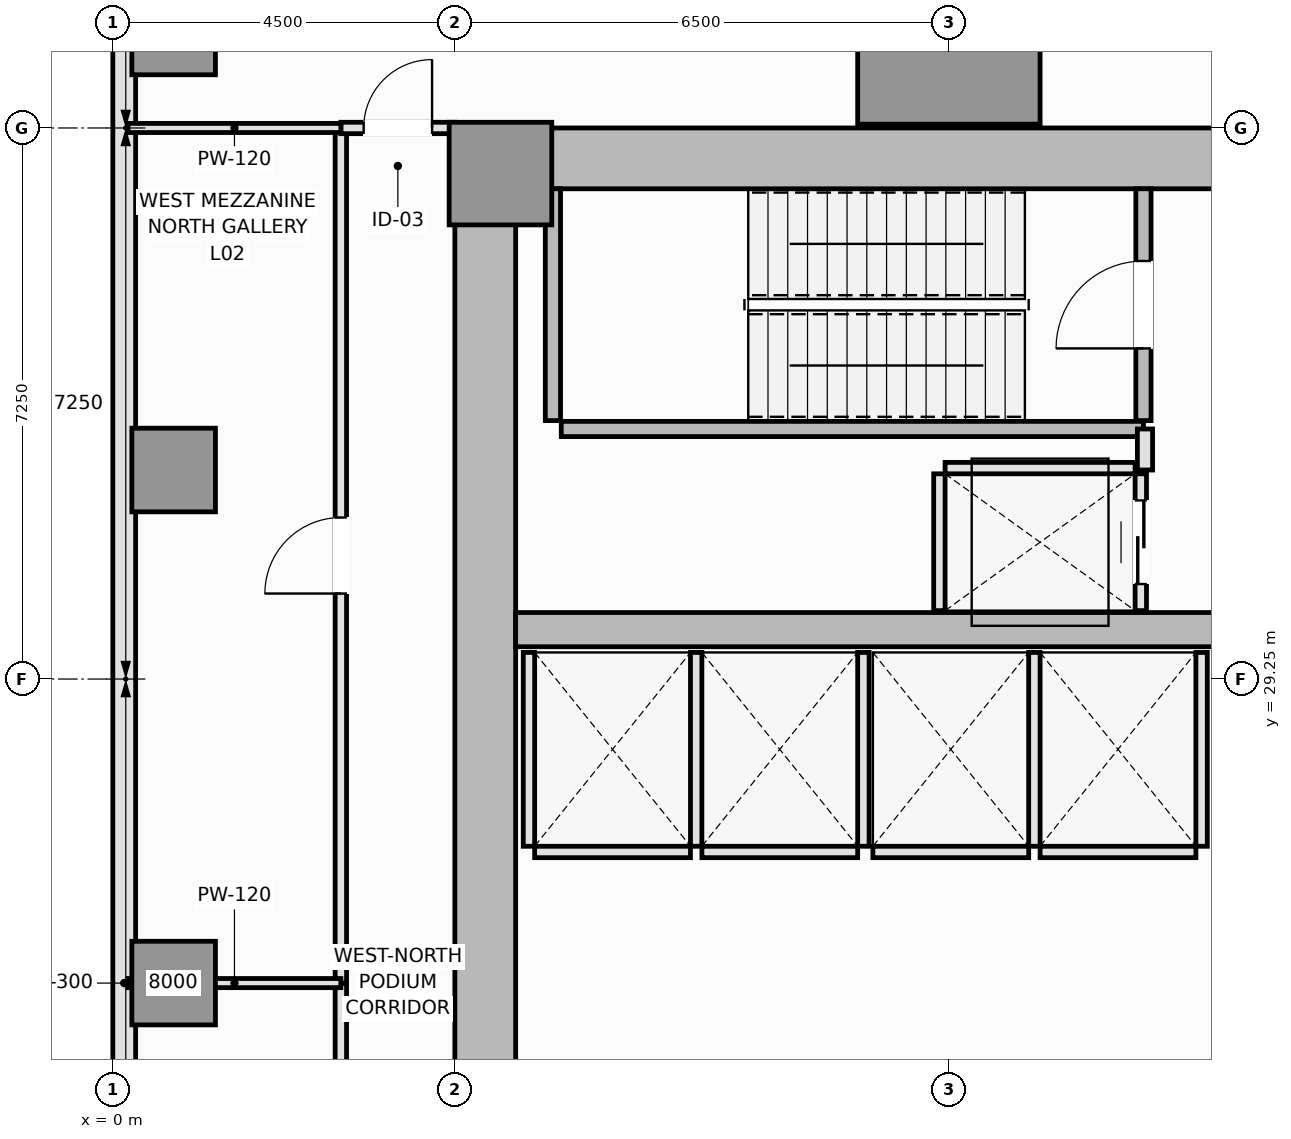
"""IFC4 building model, lengths in metres.
Left out: names, types, materials, properties, quantities, classifications, styles, units other than length and angle.
Written with IfcOpenShell. Run it as: python <this file> out.ifc"""

import sys

from ifc_helpers import new_model, si_unit, direction, frame, frame_2d, origin, origin_2d, place, context, subcontext, project, spatial, rectangle, extrude, element, fill, save


model = new_model("IFC4")
c1 = context("Model", 3, precision=1e-05, world=origin(), true_north=direction((0.0, 1.0)))
c2 = subcontext(c1, "Body", "Model", "MODEL_VIEW")
j1 = project(units=[si_unit("LENGTHUNIT", "METRE"), si_unit("PLANEANGLEUNIT", "RADIAN")], contexts=[c1])
p1 = place(None, origin())
s1 = spatial("IfcSite", under=j1, at=p1, CompositionType="ELEMENT")
p2 = place(p1, origin())
s2 = spatial("IfcBuilding", under=s1, at=p2, CompositionType="ELEMENT")
p3 = place(p2, frame((0.0, 0.0, 10.8)))
s3 = spatial("IfcBuildingStorey", under=s2, at=p3, CompositionType="ELEMENT", Elevation=10.8)
p4 = place(p3, frame((4.5, 36.1, 0.0), z_axis=(0.0, 0.0, 1.0), x_axis=(1.0, 0.0, 0.0)))
e1 = element("IfcWall", 1, at=p4, inside=s3, PredefinedType="SHEAR", context=c2, shape_type="SweptSolid", body=[
    extrude(rectangle(XDim=13.5, YDim=0.8, at=frame_2d((6.75, 0.0))), origin(), (0.0, 0.0, 1.0), 4.8),
])
p5 = place(p3, frame((4.9, 14.8, 0.0), z_axis=(0.0, 0.0, 1.0), x_axis=(0.0, 1.0, 0.0)))
e2 = element("IfcWall", 2, at=p5, inside=s3, PredefinedType="SHEAR", context=c2, shape_type="SweptSolid", body=[
    extrude(rectangle(XDim=20.9, YDim=0.8, at=frame_2d((10.45, 0.0))), origin(), (0.0, 0.0, 1.0), 4.8),
])
p6 = place(p3, frame((5.3, 29.9, 0.0), z_axis=(0.0, 0.0, 1.0), x_axis=(1.0, 0.0, 0.0)))
e3 = element("IfcWall", 3, at=p6, inside=s3, PredefinedType="SHEAR", context=c2, shape_type="SweptSolid", body=[
    extrude(rectangle(XDim=11.9, YDim=0.45, at=frame_2d((5.95, 0.0))), origin(), (0.0, 0.0, 1.0), 4.8),
])
p7 = place(p3, frame((5.1, 35.9, 0.0), z_axis=(0.0, 0.0, 1.0), x_axis=(1.0, 0.0, 0.0)))
e4 = element("IfcColumn", 4, at=p7, inside=s3, PredefinedType="PILASTER", context=c2, shape_type="SweptSolid", body=[
    extrude(rectangle(XDim=1.35, YDim=1.35, at=origin_2d()), origin(), (0.0, 0.0, 1.0), 4.8),
])
p8 = place(p3, frame((11.0, 37.75, 0.0), z_axis=(0.0, 0.0, 1.0), x_axis=(1.0, 0.0, 0.0)))
e5 = element("IfcColumn", 5, at=p8, inside=s3, PredefinedType="COLUMN", context=c2, shape_type="SweptSolid", body=[
    extrude(rectangle(XDim=2.4, YDim=2.4, at=origin_2d()), origin(), (0.0, 0.0, 1.0), 4.8),
])
for number, where, z_axis, x_axis in (
    (6, (0.8, 25.25, 0.0), (0.0, 0.0, 1.0), (1.0, 0.0, 0.0)),
    (7, (0.8, 32.0, 0.0), (0.0, 0.0, 1.0), (1.0, 0.0, 0.0)),
    (8, (0.8, 37.75, 0.0), (0.0, 0.0, 1.0), (1.0, 0.0, 0.0)),
):
    element("IfcColumn", number, at=place(p3, frame(where, z_axis=z_axis, x_axis=x_axis)), inside=s3, PredefinedType="COLUMN", context=c2, shape_type="SweptSolid", body=[
        extrude(rectangle(XDim=1.1, YDim=1.1, at=origin_2d()), origin(), (0.0, 0.0, 1.0), 4.8),
    ])
p9 = place(p3, frame((0.15, 50.35, 0.0), z_axis=(0.0, 0.0, 1.0), x_axis=(0.0, -1.0, 0.0)))
e9 = element("IfcWall", 9, at=p9, inside=s3, PredefinedType="SOLIDWALL", context=c2, shape_type="SweptSolid", body=[
    extrude(rectangle(XDim=50.2, YDim=0.3, at=frame_2d((25.1, 0.0))), origin(), (0.0, 0.0, 1.0), 4.6),
])
p10 = place(p9, frame((6.5, 0.0, 0.9)))
e10 = element("IfcOpeningElement", 10, at=p10, cuts=e9, PredefinedType="OPENING", context=c2, shape_type="SweptSolid", body=[
    extrude(rectangle(XDim=2.6, YDim=2.2, at=frame_2d((1.3, 1.1))), frame((0.0, 0.16, 0.0), z_axis=(0.0, -1.0, 0.0), x_axis=(1.0, 0.0, 0.0)), (0.0, 0.0, 1.0), 0.32),
])
p11 = place(p9, frame((42.0, 0.0, 0.9)))
e11 = element("IfcOpeningElement", 11, at=p11, cuts=e9, PredefinedType="OPENING", context=c2, shape_type="SweptSolid", body=[
    extrude(rectangle(XDim=2.6, YDim=2.2, at=frame_2d((1.3, 1.1))), frame((0.0, 0.16, 0.0), z_axis=(0.0, -1.0, 0.0), x_axis=(1.0, 0.0, 0.0)), (0.0, 0.0, 1.0), 0.32),
])
p12 = place(p3, frame((5.79, 32.65, 0.0), z_axis=(0.0, 0.0, 1.0), x_axis=(0.0, 1.0, 0.0)))
e12 = element("IfcWall", 12, at=p12, inside=s3, PredefinedType="SOLIDWALL", context=c2, shape_type="SweptSolid", body=[
    extrude(rectangle(XDim=3.05, YDim=0.2, at=frame_2d((1.525, 0.0))), origin(), (0.0, 0.0, 1.0), 4.8),
])
p13 = place(p3, frame((5.9, 32.54, 0.0), z_axis=(0.0, 0.0, 1.0), x_axis=(1.0, 0.0, 0.0)))
e13 = element("IfcWall", 13, at=p13, inside=s3, PredefinedType="SOLIDWALL", context=c2, shape_type="SweptSolid", body=[
    extrude(rectangle(XDim=7.66, YDim=0.2, at=frame_2d((3.83, 0.0))), origin(), (0.0, 0.0, 1.0), 4.8),
])
p14 = place(p3, frame((13.56, 32.65, 0.0), z_axis=(0.0, 0.0, 1.0), x_axis=(0.0, 1.0, 0.0)))
e14 = element("IfcWall", 14, at=p14, inside=s3, PredefinedType="SOLIDWALL", context=c2, shape_type="SweptSolid", body=[
    extrude(rectangle(XDim=3.05, YDim=0.2, at=frame_2d((1.525, 0.0))), origin(), (0.0, 0.0, 1.0), 4.8),
])
p15 = place(p14, frame((0.95, 0.0, 0.0)))
e15 = element("IfcOpeningElement", 15, at=p15, cuts=e14, PredefinedType="OPENING", context=c2, shape_type="SweptSolid", body=[
    extrude(rectangle(XDim=1.15, YDim=2.15, at=frame_2d((0.575, 1.075))), frame((0.0, 0.11, 0.0), z_axis=(0.0, -1.0, 0.0), x_axis=(1.0, 0.0, 0.0)), (0.0, 0.0, 1.0), 0.22),
])
p16 = place(p3, frame((5.55, 26.975, 0.0), z_axis=(0.0, 0.0, 1.0), x_axis=(1.0, 0.0, 0.0)))
e16 = element("IfcWall", 16, at=p16, inside=s3, PredefinedType="PARTITIONING", context=c2, shape_type="SweptSolid", body=[
    extrude(rectangle(XDim=2.05, YDim=0.15, at=frame_2d((1.025, 0.0))), origin(), (0.0, 0.0, 1.0), 4.6),
])
for number, where, z_axis, x_axis in (
    (17, (5.475, 27.05, 0.0), (0.0, 0.0, 1.0), (0.0, 1.0, 0.0)),
    (18, (7.675, 27.05, 0.0), (0.0, 0.0, 1.0), (0.0, 1.0, 0.0)),
):
    element("IfcWall", number, at=place(p3, frame(where, z_axis=z_axis, x_axis=x_axis)), inside=s3, PredefinedType="PARTITIONING", context=c2, shape_type="SweptSolid", body=[
        extrude(rectangle(XDim=2.55, YDim=0.15, at=frame_2d((1.275, 0.0))), origin(), (0.0, 0.0, 1.0), 4.6),
    ])
p17 = place(p3, frame((7.75, 26.975, 0.0), z_axis=(0.0, 0.0, 1.0), x_axis=(1.0, 0.0, 0.0)))
e19 = element("IfcWall", 19, at=p17, inside=s3, PredefinedType="PARTITIONING", context=c2, shape_type="SweptSolid", body=[
    extrude(rectangle(XDim=2.05, YDim=0.15, at=frame_2d((1.025, 0.0))), origin(), (0.0, 0.0, 1.0), 4.6),
])
p18 = place(p3, frame((9.875, 27.05, 0.0), z_axis=(0.0, 0.0, 1.0), x_axis=(0.0, 1.0, 0.0)))
e20 = element("IfcWall", 20, at=p18, inside=s3, PredefinedType="PARTITIONING", context=c2, shape_type="SweptSolid", body=[
    extrude(rectangle(XDim=2.55, YDim=0.15, at=frame_2d((1.275, 0.0))), origin(), (0.0, 0.0, 1.0), 4.6),
])
p19 = place(p3, frame((10.0, 26.975, 0.0), z_axis=(0.0, 0.0, 1.0), x_axis=(1.0, 0.0, 0.0)))
e21 = element("IfcWall", 21, at=p19, inside=s3, PredefinedType="PARTITIONING", context=c2, shape_type="SweptSolid", body=[
    extrude(rectangle(XDim=2.05, YDim=0.15, at=frame_2d((1.025, 0.0))), origin(), (0.0, 0.0, 1.0), 4.6),
])
p20 = place(p3, frame((12.125, 27.05, 0.0), z_axis=(0.0, 0.0, 1.0), x_axis=(0.0, 1.0, 0.0)))
e22 = element("IfcWall", 22, at=p20, inside=s3, PredefinedType="PARTITIONING", context=c2, shape_type="SweptSolid", body=[
    extrude(rectangle(XDim=2.55, YDim=0.15, at=frame_2d((1.275, 0.0))), origin(), (0.0, 0.0, 1.0), 4.6),
])
p21 = place(p3, frame((12.2, 26.975, 0.0), z_axis=(0.0, 0.0, 1.0), x_axis=(1.0, 0.0, 0.0)))
e23 = element("IfcWall", 23, at=p21, inside=s3, PredefinedType="PARTITIONING", context=c2, shape_type="SweptSolid", body=[
    extrude(rectangle(XDim=2.05, YDim=0.15, at=frame_2d((1.025, 0.0))), origin(), (0.0, 0.0, 1.0), 4.6),
])
p22 = place(p3, frame((14.325, 27.05, 0.0), z_axis=(0.0, 0.0, 1.0), x_axis=(0.0, 1.0, 0.0)))
e24 = element("IfcWall", 24, at=p22, inside=s3, PredefinedType="PARTITIONING", context=c2, shape_type="SweptSolid", body=[
    extrude(rectangle(XDim=2.55, YDim=0.15, at=frame_2d((1.275, 0.0))), origin(), (0.0, 0.0, 1.0), 4.6),
])
p23 = place(p3, frame((10.95, 32.025, 0.0), z_axis=(0.0, 0.0, 1.0), x_axis=(1.0, 0.0, 0.0)))
e25 = element("IfcWall", 25, at=p23, inside=s3, PredefinedType="PARTITIONING", context=c2, shape_type="SweptSolid", body=[
    extrude(rectangle(XDim=2.5, YDim=0.15, at=frame_2d((1.25, 0.0))), origin(), (0.0, 0.0, 1.0), 4.6),
])
p24 = place(p3, frame((10.875, 30.15, 0.0), z_axis=(0.0, 0.0, 1.0), x_axis=(0.0, 1.0, 0.0)))
e26 = element("IfcWall", 26, at=p24, inside=s3, PredefinedType="PARTITIONING", context=c2, shape_type="SweptSolid", body=[
    extrude(rectangle(XDim=1.8, YDim=0.15, at=frame_2d((0.9, 0.0))), origin(), (0.0, 0.0, 1.0), 4.6),
])
p25 = place(p3, frame((13.525, 30.15, 0.0), z_axis=(0.0, 0.0, 1.0), x_axis=(0.0, 1.0, 0.0)))
e27 = element("IfcWall", 27, at=p25, inside=s3, PredefinedType="PARTITIONING", context=c2, shape_type="SweptSolid", body=[
    extrude(rectangle(XDim=1.8, YDim=0.15, at=frame_2d((0.9, 0.0))), origin(), (0.0, 0.0, 1.0), 4.6),
])
p26 = place(p25, frame((0.35, 0.0, 0.0)))
e28 = element("IfcOpeningElement", 28, at=p26, cuts=e27, PredefinedType="OPENING", context=c2, shape_type="SweptSolid", body=[
    extrude(rectangle(XDim=1.1, YDim=2.2, at=frame_2d((0.55, 1.1))), frame((0.0, 0.085, 0.0), z_axis=(0.0, -1.0, 0.0), x_axis=(1.0, 0.0, 0.0)), (0.0, 0.0, 1.0), 0.17),
])
p27 = place(p3, frame((13.58, 32.0, 0.0), z_axis=(0.0, 0.0, 1.0), x_axis=(0.0, 1.0, 0.0)))
e29 = element("IfcWall", 29, at=p27, inside=s3, PredefinedType="PARTITIONING", context=c2, shape_type="SweptSolid", body=[
    extrude(rectangle(XDim=0.54, YDim=0.2, at=frame_2d((0.27, 0.0))), origin(), (0.0, 0.0, 1.0), 4.6),
])
p28 = place(p3, frame((3.0, 14.0, 0.0), z_axis=(0.0, 0.0, 1.0), x_axis=(0.0, 1.0, 0.0)))
e30 = element("IfcWall", 30, at=p28, inside=s3, PredefinedType="PARTITIONING", context=c2, shape_type="SweptSolid", body=[
    extrude(rectangle(XDim=11.25, YDim=0.15, at=frame_2d((5.625, 0.0))), origin(), (0.0, 0.0, 1.0), 4.6),
])
p29 = place(p28, frame((5.125, 0.0, 0.0)))
e31 = element("IfcOpeningElement", 31, at=p29, cuts=e30, PredefinedType="OPENING", context=c2, shape_type="SweptSolid", body=[
    extrude(rectangle(XDim=1.0, YDim=2.15, at=frame_2d((0.5, 1.075))), frame((0.0, 0.085, 0.0), z_axis=(0.0, -1.0, 0.0), x_axis=(1.0, 0.0, 0.0)), (0.0, 0.0, 1.0), 0.17),
])
p30 = place(p3, frame((3.0, 25.25, 0.0), z_axis=(0.0, 0.0, 1.0), x_axis=(0.0, 1.0, 0.0)))
e32 = element("IfcWall", 32, at=p30, inside=s3, PredefinedType="PARTITIONING", context=c2, shape_type="SweptSolid", body=[
    extrude(rectangle(XDim=11.25, YDim=0.15, at=frame_2d((5.625, 0.0))), origin(), (0.0, 0.0, 1.0), 4.6),
])
p31 = place(p30, frame((5.125, 0.0, 0.0)))
e33 = element("IfcOpeningElement", 33, at=p31, cuts=e32, PredefinedType="OPENING", context=c2, shape_type="SweptSolid", body=[
    extrude(rectangle(XDim=1.0, YDim=2.15, at=frame_2d((0.5, 1.075))), frame((0.0, 0.085, 0.0), z_axis=(0.0, -1.0, 0.0), x_axis=(1.0, 0.0, 0.0)), (0.0, 0.0, 1.0), 0.17),
])
p32 = place(p3, frame((3.0, 36.5, 0.0), z_axis=(0.0, 0.0, 1.0), x_axis=(1.0, 0.0, 0.0)))
e34 = element("IfcWall", 34, at=p32, inside=s3, PredefinedType="PARTITIONING", context=c2, shape_type="SweptSolid", body=[
    extrude(rectangle(XDim=1.5, YDim=0.15, at=frame_2d((0.75, 0.0))), origin(), (0.0, 0.0, 1.0), 4.6),
])
p33 = place(p32, frame((0.3, 0.0, 0.0)))
e35 = element("IfcOpeningElement", 35, at=p33, cuts=e34, PredefinedType="OPENING", context=c2, shape_type="SweptSolid", body=[
    extrude(rectangle(XDim=0.9, YDim=2.1, at=frame_2d((0.45, 1.05))), frame((0.0, 0.085, 0.0), z_axis=(0.0, -1.0, 0.0), x_axis=(1.0, 0.0, 0.0)), (0.0, 0.0, 1.0), 0.17),
])
p34 = place(p3, frame((0.2, 25.25, 0.0), z_axis=(0.0, 0.0, 1.0), x_axis=(1.0, 0.0, 0.0)))
e36 = element("IfcWall", 36, at=p34, inside=s3, PredefinedType="PARTITIONING", context=c2, shape_type="SweptSolid", body=[
    extrude(rectangle(XDim=2.8, YDim=0.12, at=frame_2d((1.4, 0.0))), origin(), (0.0, 0.0, 1.0), 3.8),
])
p35 = place(p3, frame((0.2, 36.5, 0.0), z_axis=(0.0, 0.0, 1.0), x_axis=(1.0, 0.0, 0.0)))
e37 = element("IfcWall", 37, at=p35, inside=s3, PredefinedType="PARTITIONING", context=c2, shape_type="SweptSolid", body=[
    extrude(rectangle(XDim=2.8, YDim=0.12, at=frame_2d((1.4, 0.0))), origin(), (0.0, 0.0, 1.0), 4.6),
])
p36 = place(p15, origin())
e38 = element("IfcDoor", 38, at=p36, inside=s3, OperationType="SINGLE_SWING_LEFT", PredefinedType="DOOR", context=c2, shape_type="SweptSolid", body=[
    extrude(rectangle(XDim=1.15, YDim=2.15, at=frame_2d((0.575, 1.075))), frame((0.0, 0.025, 0.0), z_axis=(0.0, -1.0, 0.0), x_axis=(1.0, 0.0, 0.0)), (0.0, 0.0, 1.0), 0.05),
])
fill(e15, e38)
p37 = place(p26, origin())
e39 = element("IfcDoor", 39, at=p37, inside=s3, OperationType="DOUBLE_DOOR_SLIDING", PredefinedType="DOOR", context=c2, shape_type="SweptSolid", body=[
    extrude(rectangle(XDim=1.1, YDim=2.2, at=frame_2d((0.55, 1.1))), frame((0.0, 0.025, 0.0), z_axis=(0.0, -1.0, 0.0), x_axis=(1.0, 0.0, 0.0)), (0.0, 0.0, 1.0), 0.05),
])
fill(e28, e39)
p38 = place(p31, origin())
e40 = element("IfcDoor", 40, at=p38, inside=s3, OperationType="SINGLE_SWING_LEFT", PredefinedType="DOOR", context=c2, shape_type="SweptSolid", body=[
    extrude(rectangle(XDim=1.0, YDim=2.15, at=frame_2d((0.5, 1.075))), frame((0.0, 0.025, 0.0), z_axis=(0.0, -1.0, 0.0), x_axis=(1.0, 0.0, 0.0)), (0.0, 0.0, 1.0), 0.05),
])
fill(e33, e40)
p39 = place(p33, origin())
e41 = element("IfcDoor", 41, at=p39, inside=s3, OperationType="SINGLE_SWING_RIGHT", PredefinedType="DOOR", context=c2, shape_type="SweptSolid", body=[
    extrude(rectangle(XDim=0.9, YDim=2.1, at=frame_2d((0.45, 1.05))), frame((0.0, 0.025, 0.0), z_axis=(0.0, -1.0, 0.0), x_axis=(1.0, 0.0, 0.0)), (0.0, 0.0, 1.0), 0.05),
])
fill(e35, e41)
save(model, sys.argv[1])
